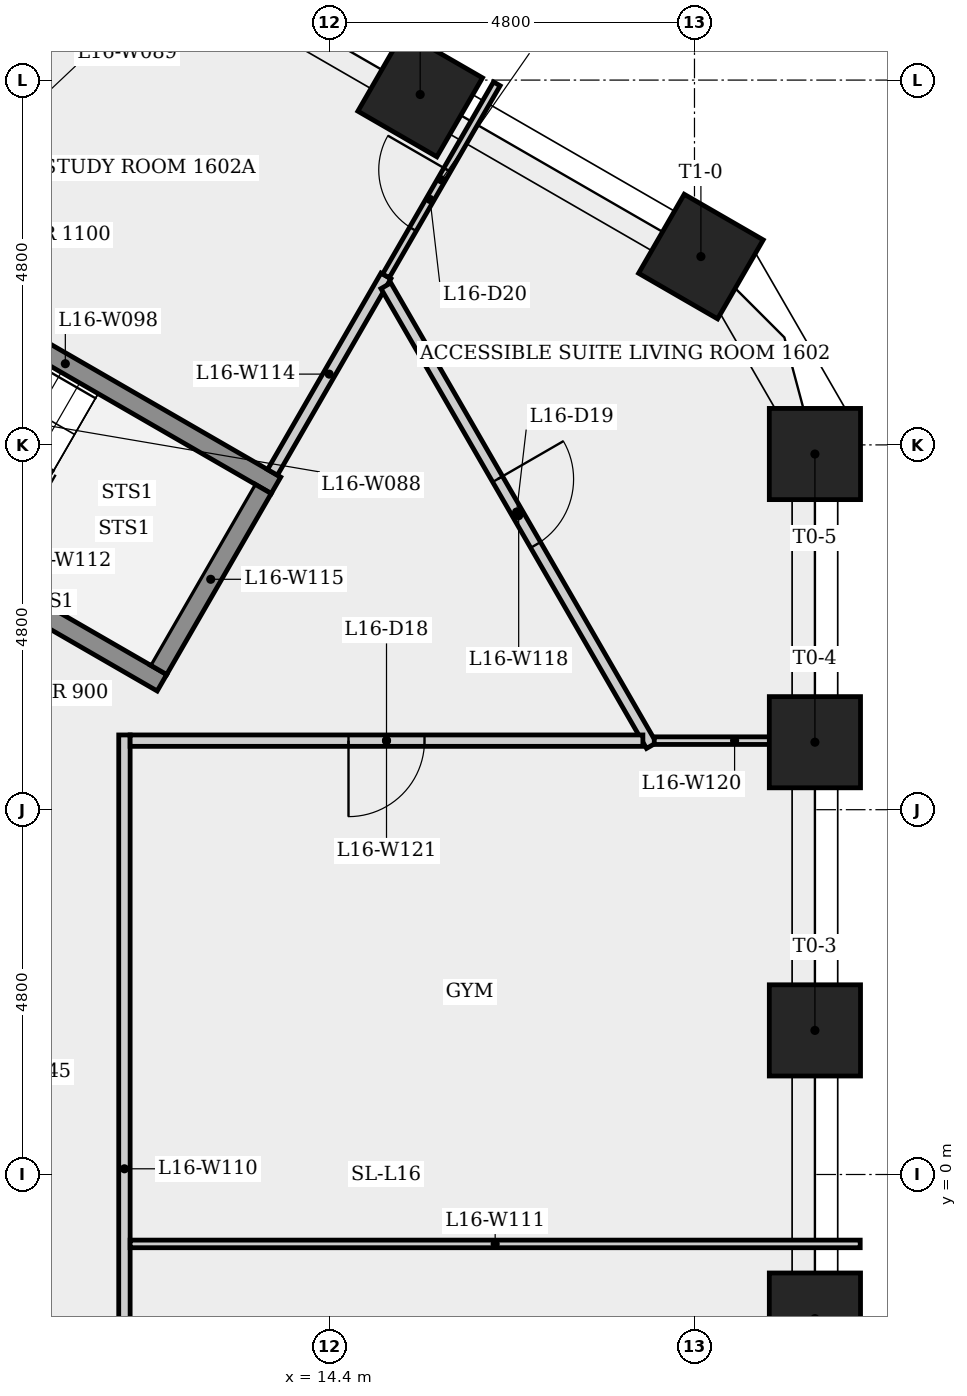
"""IFC4 building model, lengths in metres.
Left out: names, types, materials, properties, quantities, classifications, styles, units other than length and angle.
Written with IfcOpenShell. Run it as: python <this file> out.ifc"""

import sys

from ifc_helpers import new_model, si_unit, direction, frame, frame_2d, origin, origin_2d, place, context, subcontext, project, spatial, rectangle, extrude, element, fill, save


model = new_model("IFC4")
c1 = context("Model", 3, precision=1e-05, world=origin(), true_north=direction((0.0, 1.0)))
c2 = subcontext(c1, "Body", "Model", "MODEL_VIEW")
j1 = project(units=[si_unit("LENGTHUNIT", "METRE"), si_unit("PLANEANGLEUNIT", "RADIAN")], contexts=[c1])
p1 = place(None, origin())
s1 = spatial("IfcSite", under=j1, at=p1, CompositionType="ELEMENT")
p2 = place(p1, origin())
s2 = spatial("IfcBuilding", under=s1, at=p2, CompositionType="ELEMENT")
p3 = place(p2, frame((0.0, 0.0, 62.9)))
s3 = spatial("IfcBuildingStorey", under=s2, at=p3, CompositionType="ELEMENT", Elevation=62.9)
for number, where, z_axis, x_axis in (
    (1, (20.785, -1.896, 0.0), (0.0, 0.0, 1.0), (1.0, 0.0, 0.0)),
    (2, (20.785, 1.896, 0.0), (0.0, 0.0, 1.0), (1.0, 0.0, 0.0)),
    (3, (20.785, 5.688, 0.0), (0.0, 0.0, 1.0), (1.0, 0.0, 0.0)),
    (4, (20.785, 9.48, 0.0), (0.0, 0.0, 1.0), (1.0, 0.0, 0.0)),
    (5, (19.285, 12.078, 0.0), (0.0, 0.0, 1.0), (0.5, 0.866, 0.0)),
    (6, (15.591, 14.21, 0.0), (0.0, 0.0, 1.0), (0.5, 0.866, 0.0)),
):
    element("IfcColumn", number, at=place(p3, frame(where, z_axis=z_axis, x_axis=x_axis)), inside=s3, PredefinedType="COLUMN", context=c2, shape_type="SweptSolid", body=[
        extrude(rectangle(XDim=1.2, YDim=1.2, at=origin_2d()), origin(), (0.0, 0.0, 1.0), 3.4),
    ])
p4 = place(p3, frame((8.151, 12.268, 0.0), z_axis=(0.0, 0.0, 1.0), x_axis=(0.866025499775, -0.499999833739, 0.0)))
e7 = element("IfcWall", 7, at=p4, inside=s3, PredefinedType="SHEAR", context=c2, shape_type="SweptSolid", body=[
    extrude(rectangle(XDim=6.4, YDim=0.25, at=frame_2d((3.2, 0.0))), origin(), (0.0, 0.0, 1.0), 3.0),
])
p5 = place(p3, frame((11.7, -5.634, 0.0), z_axis=(0.0, 0.0, 1.0), x_axis=(0.0, 1.0, 0.0)))
e8 = element("IfcWall", 8, at=p5, inside=s3, PredefinedType="PARTITIONING", context=c2, shape_type="SweptSolid", body=[
    extrude(rectangle(XDim=11.417, YDim=0.15, at=frame_2d((5.708, 0.0))), origin(), (0.0, 0.0, 1.0), 3.0),
])
p6 = place(p3, frame((11.775, -0.913, 0.0), z_axis=(0.0, 0.0, 1.0), x_axis=(1.0, 0.0, 0.0)))
e9 = element("IfcWall", 9, at=p6, inside=s3, PredefinedType="PARTITIONING", context=c2, shape_type="SweptSolid", body=[
    extrude(rectangle(XDim=9.606, YDim=0.1, at=frame_2d((4.803, 0.0))), origin(), (0.0, 0.0, 1.0), 3.0),
])
p7 = place(p3, frame((12.194, 6.47, 0.0), z_axis=(0.0, 0.0, 1.0), x_axis=(-0.866025499775, 0.499999833739, 0.0)))
e10 = element("IfcWall", 10, at=p7, inside=s3, PredefinedType="SHEAR", context=c2, shape_type="SweptSolid", body=[
    extrude(rectangle(XDim=6.4, YDim=0.25, at=frame_2d((3.2, 0.0))), origin(), (0.0, 0.0, 1.0), 3.0),
])
p8 = place(p7, frame((5.25, 0.0, 0.0)))
e11 = element("IfcOpeningElement", 11, at=p8, cuts=e10, PredefinedType="OPENING", context=c2, shape_type="SweptSolid", body=[
    extrude(rectangle(XDim=1.0, YDim=2.1, at=frame_2d((0.5, 1.05))), frame((0.0, 0.135, 0.0), z_axis=(0.0, -1.0, 0.0), x_axis=(1.0, 0.0, 0.0)), (0.0, 0.0, 1.0), 0.27),
])
p9 = place(p3, frame((13.648, 9.239, 0.0), z_axis=(0.0, 0.0, 1.0), x_axis=(0.500026865748, 0.866009892282, 0.0)))
e12 = element("IfcWall", 12, at=p9, inside=s3, PredefinedType="PARTITIONING", context=c2, shape_type="SweptSolid", body=[
    extrude(rectangle(XDim=2.985, YDim=0.15, at=frame_2d((1.493, 0.0))), origin(), (0.0, 0.0, 1.0), 3.0),
])
p10 = place(p3, frame((13.523, 9.022, 0.0), z_axis=(0.0, 0.0, 1.0), x_axis=(-0.500034990121, -0.866005201286, 0.0)))
e13 = element("IfcWall", 13, at=p10, inside=s3, PredefinedType="SHEAR", context=c2, shape_type="SweptSolid", body=[
    extrude(rectangle(XDim=2.75, YDim=0.25, at=frame_2d((1.375, 0.0))), origin(), (0.0, 0.0, 1.0), 3.0),
])
p11 = place(p3, frame((15.14, 11.824, 0.0), z_axis=(0.0, 0.0, 1.0), x_axis=(0.500026652407, 0.866010015463, 0.0)))
e14 = element("IfcWall", 14, at=p11, inside=s3, PredefinedType="PARTITIONING", context=c2, shape_type="SweptSolid", body=[
    extrude(rectangle(XDim=2.918, YDim=0.1, at=frame_2d((1.459, 0.0))), origin(), (0.0, 0.0, 1.0), 3.0),
])
p12 = place(p11, frame((0.711, 0.0, 0.0)))
e15 = element("IfcOpeningElement", 15, at=p12, cuts=e14, PredefinedType="OPENING", context=c2, shape_type="SweptSolid", body=[
    extrude(rectangle(XDim=0.9, YDim=2.1, at=frame_2d((0.45, 1.05))), frame((0.0, 0.06, 0.0), z_axis=(0.0, -1.0, 0.0), x_axis=(1.0, 0.0, 0.0)), (0.0, 0.0, 1.0), 0.12),
])
p13 = place(p3, frame((15.14, 11.694, 0.0), z_axis=(0.0, 0.0, 1.0), x_axis=(0.500013845068, -0.866017410183, 0.0)))
e16 = element("IfcWall", 16, at=p13, inside=s3, PredefinedType="PARTITIONING", context=c2, shape_type="SweptSolid", body=[
    extrude(rectangle(XDim=6.987, YDim=0.15, at=frame_2d((3.493, 0.0))), origin(), (0.0, 0.0, 1.0), 3.0),
])
p14 = place(p13, frame((2.938, 0.0, 0.0)))
e17 = element("IfcOpeningElement", 17, at=p14, cuts=e16, PredefinedType="OPENING", context=c2, shape_type="SweptSolid", body=[
    extrude(rectangle(XDim=1.0, YDim=2.1, at=frame_2d((0.5, 1.05))), frame((0.0, 0.085, 0.0), z_axis=(0.0, -1.0, 0.0), x_axis=(1.0, 0.0, 0.0)), (0.0, 0.0, 1.0), 0.17),
])
p15 = place(p3, frame((18.671, 5.708, 0.0), z_axis=(0.0, 0.0, 1.0), x_axis=(1.0, 0.0, 0.0)))
e18 = element("IfcWall", 18, at=p15, inside=s3, PredefinedType="PARTITIONING", context=c2, shape_type="SweptSolid", body=[
    extrude(rectangle(XDim=2.114, YDim=0.1, at=frame_2d((1.057, 0.0))), origin(), (0.0, 0.0, 1.0), 3.0),
])
p16 = place(p3, frame((18.521, 5.708, 0.0), z_axis=(0.0, 0.0, 1.0), x_axis=(-1.0, 0.0, 0.0)))
e19 = element("IfcWall", 19, at=p16, inside=s3, PredefinedType="PARTITIONING", context=c2, shape_type="SweptSolid", body=[
    extrude(rectangle(XDim=6.746, YDim=0.15, at=frame_2d((3.373, 0.0))), origin(), (0.0, 0.0, 1.0), 3.0),
])
p17 = place(p16, frame((2.873, 0.0, 0.0)))
e20 = element("IfcOpeningElement", 20, at=p17, cuts=e19, PredefinedType="OPENING", context=c2, shape_type="SweptSolid", body=[
    extrude(rectangle(XDim=1.0, YDim=2.1, at=frame_2d((0.5, 1.05))), frame((0.0, 0.085, 0.0), z_axis=(0.0, -1.0, 0.0), x_axis=(1.0, 0.0, 0.0)), (0.0, 0.0, 1.0), 0.17),
])
p18 = place(p17, origin())
e21 = element("IfcDoor", 21, at=p18, inside=s3, OperationType="SINGLE_SWING_RIGHT", PredefinedType="DOOR", context=c2, shape_type="SweptSolid", body=[
    extrude(rectangle(XDim=1.0, YDim=2.1, at=frame_2d((0.5, 1.05))), frame((0.0, 0.025, 0.0), z_axis=(0.0, -1.0, 0.0), x_axis=(1.0, 0.0, 0.0)), (0.0, 0.0, 1.0), 0.05),
])
fill(e20, e21)
p19 = place(p14, origin())
e22 = element("IfcDoor", 22, at=p19, inside=s3, OperationType="SINGLE_SWING_LEFT", PredefinedType="DOOR", context=c2, shape_type="SweptSolid", body=[
    extrude(rectangle(XDim=1.0, YDim=2.1, at=frame_2d((0.5, 1.05))), frame((0.0, 0.025, 0.0), z_axis=(0.0, -1.0, 0.0), x_axis=(1.0, 0.0, 0.0)), (0.0, 0.0, 1.0), 0.05),
])
fill(e17, e22)
p20 = place(p12, origin())
e23 = element("IfcDoor", 23, at=p20, inside=s3, OperationType="SINGLE_SWING_RIGHT", PredefinedType="DOOR", context=c2, shape_type="SweptSolid", body=[
    extrude(rectangle(XDim=0.9, YDim=2.1, at=frame_2d((0.45, 1.05))), frame((0.0, 0.025, 0.0), z_axis=(0.0, -1.0, 0.0), x_axis=(1.0, 0.0, 0.0)), (0.0, 0.0, 1.0), 0.05),
])
fill(e15, e23)
save(model, sys.argv[1])
